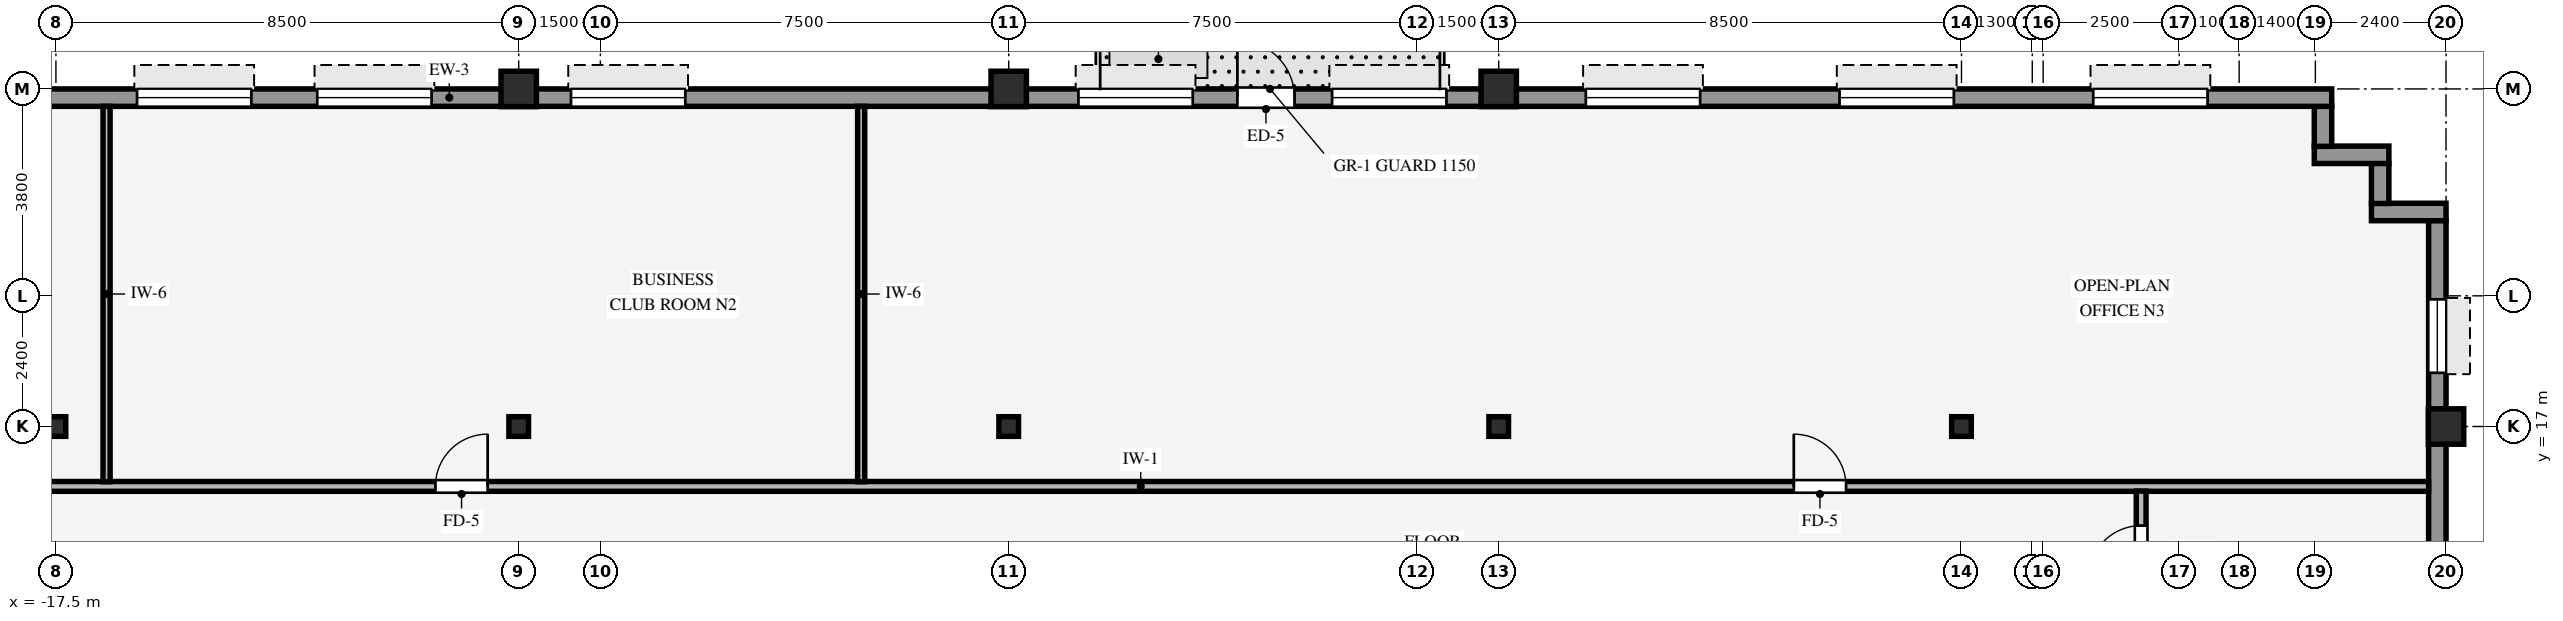
"""IFC4 building model, lengths in metres.
Left out: names, types, materials, properties, quantities, classifications, styles, units other than length and angle.
Written with IfcOpenShell. Run it as: python <this file> out.ifc"""

import sys

from ifc_helpers import new_model, si_unit, direction, frame, frame_2d, origin, origin_2d, place, context, subcontext, project, spatial, rectangle, hollow_rectangle, i_section, extrude, source, transform, mapped, element, fill, save


model = new_model("IFC4")
c1 = context("Model", 3, precision=1e-05, world=origin(), true_north=direction((0.0, 1.0)))
c2 = subcontext(c1, "Body", "Model", "MODEL_VIEW")
j1 = project(units=[si_unit("LENGTHUNIT", "METRE"), si_unit("PLANEANGLEUNIT", "RADIAN")], contexts=[c1])
p1 = place(None, origin())
s1 = spatial("IfcSite", under=j1, at=p1, CompositionType="ELEMENT")
p2 = place(p1, origin())
s2 = spatial("IfcBuilding", under=s1, at=p2, CompositionType="ELEMENT")
p3 = place(p2, frame((0.0, 0.0, 138.45)))
s3 = spatial("IfcBuildingStorey", under=s2, at=p3, CompositionType="ELEMENT", Elevation=138.45)
for number, where, z_axis, x_axis in (
    (1, (26.4, 17.0, 0.0), (0.0, 0.0, 1.0), (1.0, 0.0, 0.0)),
    (2, (-9.0, 23.2, 0.0), (0.0, 0.0, 1.0), (1.0, 0.0, 0.0)),
    (3, (0.0, 23.2, 0.0), (0.0, 0.0, 1.0), (1.0, 0.0, 0.0)),
    (4, (9.0, 23.2, 0.0), (0.0, 0.0, 1.0), (1.0, 0.0, 0.0)),
):
    element("IfcColumn", number, at=place(p3, frame(where, z_axis=z_axis, x_axis=x_axis)), inside=s3, PredefinedType="COLUMN", context=c2, shape_type="SweptSolid", body=[
        extrude(hollow_rectangle(XDim=0.65, YDim=0.65, WallThickness=0.04, InnerFilletRadius=0.04, OuterFilletRadius=0.08, at=origin_2d()), origin(), (0.0, 0.0, 1.0), 3.37),
    ])
for number, where, z_axis, x_axis in (
    (5, (0.0, 17.0, 0.0), (0.0, 0.0, 1.0), (1.0, 0.0, 0.0)),
    (6, (-17.5, 17.0, 0.0), (0.0, 0.0, 1.0), (1.0, 0.0, 0.0)),
    (7, (-9.0, 17.0, 0.0), (0.0, 0.0, 1.0), (1.0, 0.0, 0.0)),
    (8, (9.0, 17.0, 0.0), (0.0, 0.0, 1.0), (1.0, 0.0, 0.0)),
    (9, (17.5, 17.0, 0.0), (0.0, 0.0, 1.0), (1.0, 0.0, 0.0)),
):
    element("IfcColumn", number, at=place(p3, frame(where, z_axis=z_axis, x_axis=x_axis)), inside=s3, PredefinedType="COLUMN", context=c2, shape_type="SweptSolid", body=[
        extrude(i_section(OverallWidth=0.36, OverallDepth=0.36, WebThickness=0.021, FlangeThickness=0.021, FilletRadius=0.018, at=origin_2d()), origin(), (0.0, 0.0, 1.0), 3.37),
    ])
p4 = place(p3, frame((26.24, -20.784, 0.0), z_axis=(0.0, 0.0, 1.0), x_axis=(0.0, 1.0, 0.0)))
e10 = element("IfcWall", 10, at=p4, inside=s3, PredefinedType="STANDARD", context=c2, shape_type="SweptSolid", body=[
    extrude(rectangle(XDim=41.568, YDim=0.32, at=frame_2d((20.784, 0.0))), origin(), (0.0, 0.0, 1.0), 2.705),
])
p5 = place(p4, frame((1.448, 0.0, 0.8)))
e11 = element("IfcOpeningElement", 11, at=p5, cuts=e10, PredefinedType="OPENING", context=c2, shape_type="SweptSolid", body=[
    extrude(rectangle(XDim=1.35, YDim=1.56, at=frame_2d((0.675, 0.78))), frame((0.0, 0.17, 0.0), z_axis=(0.0, -1.0, 0.0), x_axis=(1.0, 0.0, 0.0)), (0.0, 0.0, 1.0), 0.34),
])
p6 = place(p4, frame((7.744, 0.0, 0.8)))
e12 = element("IfcOpeningElement", 12, at=p6, cuts=e10, PredefinedType="OPENING", context=c2, shape_type="SweptSolid", body=[
    extrude(rectangle(XDim=1.35, YDim=1.56, at=frame_2d((0.675, 0.78))), frame((0.0, 0.17, 0.0), z_axis=(0.0, -1.0, 0.0), x_axis=(1.0, 0.0, 0.0)), (0.0, 0.0, 1.0), 0.34),
])
p7 = place(p4, frame((12.69, 0.0, 0.8)))
e13 = element("IfcOpeningElement", 13, at=p7, cuts=e10, PredefinedType="OPENING", context=c2, shape_type="SweptSolid", body=[
    extrude(rectangle(XDim=1.35, YDim=1.56, at=frame_2d((0.675, 0.78))), frame((0.0, 0.17, 0.0), z_axis=(0.0, -1.0, 0.0), x_axis=(1.0, 0.0, 0.0)), (0.0, 0.0, 1.0), 0.34),
])
p8 = place(p4, frame((17.636, 0.0, 0.8)))
e14 = element("IfcOpeningElement", 14, at=p8, cuts=e10, PredefinedType="OPENING", context=c2, shape_type="SweptSolid", body=[
    extrude(rectangle(XDim=1.35, YDim=1.56, at=frame_2d((0.675, 0.78))), frame((0.0, 0.17, 0.0), z_axis=(0.0, -1.0, 0.0), x_axis=(1.0, 0.0, 0.0)), (0.0, 0.0, 1.0), 0.34),
])
p9 = place(p4, frame((22.582, 0.0, 0.8)))
e15 = element("IfcOpeningElement", 15, at=p9, cuts=e10, PredefinedType="OPENING", context=c2, shape_type="SweptSolid", body=[
    extrude(rectangle(XDim=1.35, YDim=1.56, at=frame_2d((0.675, 0.78))), frame((0.0, 0.17, 0.0), z_axis=(0.0, -1.0, 0.0), x_axis=(1.0, 0.0, 0.0)), (0.0, 0.0, 1.0), 0.34),
])
p10 = place(p4, frame((27.528, 0.0, 0.8)))
e16 = element("IfcOpeningElement", 16, at=p10, cuts=e10, PredefinedType="OPENING", context=c2, shape_type="SweptSolid", body=[
    extrude(rectangle(XDim=1.35, YDim=1.56, at=frame_2d((0.675, 0.78))), frame((0.0, 0.17, 0.0), z_axis=(0.0, -1.0, 0.0), x_axis=(1.0, 0.0, 0.0)), (0.0, 0.0, 1.0), 0.34),
])
p11 = place(p4, frame((32.474, 0.0, 0.8)))
e17 = element("IfcOpeningElement", 17, at=p11, cuts=e10, PredefinedType="OPENING", context=c2, shape_type="SweptSolid", body=[
    extrude(rectangle(XDim=1.35, YDim=1.56, at=frame_2d((0.675, 0.78))), frame((0.0, 0.17, 0.0), z_axis=(0.0, -1.0, 0.0), x_axis=(1.0, 0.0, 0.0)), (0.0, 0.0, 1.0), 0.34),
])
p12 = place(p4, frame((38.77, 0.0, 0.8)))
e18 = element("IfcOpeningElement", 18, at=p12, cuts=e10, PredefinedType="OPENING", context=c2, shape_type="SweptSolid", body=[
    extrude(rectangle(XDim=1.35, YDim=1.56, at=frame_2d((0.675, 0.78))), frame((0.0, 0.17, 0.0), z_axis=(0.0, -1.0, 0.0), x_axis=(1.0, 0.0, 0.0)), (0.0, 0.0, 1.0), 0.34),
])
p13 = place(p3, frame((25.03, 20.94, 0.0), z_axis=(0.0, 0.0, 1.0), x_axis=(1.0, 0.0, 0.0)))
e19 = element("IfcWall", 19, at=p13, inside=s3, PredefinedType="STANDARD", context=c2, shape_type="SweptSolid", body=[
    extrude(rectangle(XDim=1.37, YDim=0.32, at=frame_2d((0.685, 0.0))), origin(), (0.0, 0.0, 1.0), 3.36),
])
p14 = place(p3, frame((25.19, 21.096, 0.0), z_axis=(0.0, 0.0, 1.0), x_axis=(0.0, 1.0, 0.0)))
e20 = element("IfcWall", 20, at=p14, inside=s3, PredefinedType="STANDARD", context=c2, shape_type="SweptSolid", body=[
    extrude(rectangle(XDim=0.738, YDim=0.32, at=frame_2d((0.369, 0.0))), origin(), (0.0, 0.0, 1.0), 3.36),
])
p15 = place(p3, frame((23.98, 21.99, 0.0), z_axis=(0.0, 0.0, 1.0), x_axis=(1.0, 0.0, 0.0)))
e21 = element("IfcWall", 21, at=p15, inside=s3, PredefinedType="STANDARD", context=c2, shape_type="SweptSolid", body=[
    extrude(rectangle(XDim=1.37, YDim=0.32, at=frame_2d((0.685, 0.0))), origin(), (0.0, 0.0, 1.0), 3.36),
])
p16 = place(p3, frame((24.14, 22.146, 0.0), z_axis=(0.0, 0.0, 1.0), x_axis=(0.0, 1.0, 0.0)))
e22 = element("IfcWall", 22, at=p16, inside=s3, PredefinedType="STANDARD", context=c2, shape_type="SweptSolid", body=[
    extrude(rectangle(XDim=0.738, YDim=0.32, at=frame_2d((0.369, 0.0))), origin(), (0.0, 0.0, 1.0), 3.36),
])
p17 = place(p3, frame((-24.3, 23.04, 0.0), z_axis=(0.0, 0.0, 1.0), x_axis=(1.0, 0.0, 0.0)))
e23 = element("IfcWall", 23, at=p17, inside=s3, PredefinedType="STANDARD", context=c2, shape_type="SweptSolid", body=[
    extrude(rectangle(XDim=48.6, YDim=0.32, at=frame_2d((24.3, 0.0))), origin(), (0.0, 0.0, 1.0), 2.705),
])
p18 = place(p17, frame((28.5, 0.0, 0.0)))
e24 = element("IfcOpeningElement", 24, at=p18, cuts=e23, PredefinedType="OPENING", context=c2, shape_type="SweptSolid", body=[
    extrude(rectangle(XDim=1.05, YDim=2.1, at=frame_2d((0.525, 1.05))), frame((0.0, 0.17, 0.0), z_axis=(0.0, -1.0, 0.0), x_axis=(1.0, 0.0, 0.0)), (0.0, 0.0, 1.0), 0.34),
])
p19 = place(p17, frame((2.28, 0.0, 0.8)))
e25 = element("IfcOpeningElement", 25, at=p19, cuts=e23, PredefinedType="OPENING", context=c2, shape_type="SweptSolid", body=[
    extrude(rectangle(XDim=2.1, YDim=1.56, at=frame_2d((1.05, 0.78))), frame((0.0, 0.17, 0.0), z_axis=(0.0, -1.0, 0.0), x_axis=(1.0, 0.0, 0.0)), (0.0, 0.0, 1.0), 0.34),
])
p20 = place(p17, frame((8.29, 0.0, 0.8)))
e26 = element("IfcOpeningElement", 26, at=p20, cuts=e23, PredefinedType="OPENING", context=c2, shape_type="SweptSolid", body=[
    extrude(rectangle(XDim=2.1, YDim=1.56, at=frame_2d((1.05, 0.78))), frame((0.0, 0.17, 0.0), z_axis=(0.0, -1.0, 0.0), x_axis=(1.0, 0.0, 0.0)), (0.0, 0.0, 1.0), 0.34),
])
p21 = place(p17, frame((11.6, 0.0, 0.8)))
e27 = element("IfcOpeningElement", 27, at=p21, cuts=e23, PredefinedType="OPENING", context=c2, shape_type="SweptSolid", body=[
    extrude(rectangle(XDim=2.1, YDim=1.56, at=frame_2d((1.05, 0.78))), frame((0.0, 0.17, 0.0), z_axis=(0.0, -1.0, 0.0), x_axis=(1.0, 0.0, 0.0)), (0.0, 0.0, 1.0), 0.34),
])
p22 = place(p17, frame((16.26, 0.0, 0.8)))
e28 = element("IfcOpeningElement", 28, at=p22, cuts=e23, PredefinedType="OPENING", context=c2, shape_type="SweptSolid", body=[
    extrude(rectangle(XDim=2.1, YDim=1.56, at=frame_2d((1.05, 0.78))), frame((0.0, 0.17, 0.0), z_axis=(0.0, -1.0, 0.0), x_axis=(1.0, 0.0, 0.0)), (0.0, 0.0, 1.0), 0.34),
])
p23 = place(p17, frame((25.58, 0.0, 0.8)))
e29 = element("IfcOpeningElement", 29, at=p23, cuts=e23, PredefinedType="OPENING", context=c2, shape_type="SweptSolid", body=[
    extrude(rectangle(XDim=2.1, YDim=1.56, at=frame_2d((1.05, 0.78))), frame((0.0, 0.17, 0.0), z_axis=(0.0, -1.0, 0.0), x_axis=(1.0, 0.0, 0.0)), (0.0, 0.0, 1.0), 0.34),
])
p24 = place(p17, frame((30.24, 0.0, 0.8)))
e30 = element("IfcOpeningElement", 30, at=p24, cuts=e23, PredefinedType="OPENING", context=c2, shape_type="SweptSolid", body=[
    extrude(rectangle(XDim=2.1, YDim=1.56, at=frame_2d((1.05, 0.78))), frame((0.0, 0.17, 0.0), z_axis=(0.0, -1.0, 0.0), x_axis=(1.0, 0.0, 0.0)), (0.0, 0.0, 1.0), 0.34),
])
p25 = place(p17, frame((34.9, 0.0, 0.8)))
e31 = element("IfcOpeningElement", 31, at=p25, cuts=e23, PredefinedType="OPENING", context=c2, shape_type="SweptSolid", body=[
    extrude(rectangle(XDim=2.1, YDim=1.56, at=frame_2d((1.05, 0.78))), frame((0.0, 0.17, 0.0), z_axis=(0.0, -1.0, 0.0), x_axis=(1.0, 0.0, 0.0)), (0.0, 0.0, 1.0), 0.34),
])
p26 = place(p17, frame((39.56, 0.0, 0.8)))
e32 = element("IfcOpeningElement", 32, at=p26, cuts=e23, PredefinedType="OPENING", context=c2, shape_type="SweptSolid", body=[
    extrude(rectangle(XDim=2.1, YDim=1.56, at=frame_2d((1.05, 0.78))), frame((0.0, 0.17, 0.0), z_axis=(0.0, -1.0, 0.0), x_axis=(1.0, 0.0, 0.0)), (0.0, 0.0, 1.0), 0.34),
])
p27 = place(p17, frame((44.22, 0.0, 0.8)))
e33 = element("IfcOpeningElement", 33, at=p27, cuts=e23, PredefinedType="OPENING", context=c2, shape_type="SweptSolid", body=[
    extrude(rectangle(XDim=2.1, YDim=1.56, at=frame_2d((1.05, 0.78))), frame((0.0, 0.17, 0.0), z_axis=(0.0, -1.0, 0.0), x_axis=(1.0, 0.0, 0.0)), (0.0, 0.0, 1.0), 0.34),
])
p28 = place(p3, frame((-26.08, 15.9, 0.0), z_axis=(0.0, 0.0, 1.0), x_axis=(1.0, 0.0, 0.0)))
e34 = element("IfcWall", 34, at=p28, inside=s3, PredefinedType="PARTITIONING", context=c2, shape_type="SweptSolid", body=[
    extrude(rectangle(XDim=52.16, YDim=0.18, at=frame_2d((26.08, 0.0))), origin(), (0.0, 0.0, 1.0), 3.36),
])
p29 = place(p28, frame((15.55, 0.0, 0.0)))
e35 = element("IfcOpeningElement", 35, at=p29, cuts=e34, PredefinedType="OPENING", context=c2, shape_type="SweptSolid", body=[
    extrude(rectangle(XDim=0.96, YDim=2.1, at=frame_2d((0.48, 1.05))), frame((0.0, 0.1, 0.0), z_axis=(0.0, -1.0, 0.0), x_axis=(1.0, 0.0, 0.0)), (0.0, 0.0, 1.0), 0.2),
])
p30 = place(p28, frame((40.5, 0.0, 0.0)))
e36 = element("IfcOpeningElement", 36, at=p30, cuts=e34, PredefinedType="OPENING", context=c2, shape_type="SweptSolid", body=[
    extrude(rectangle(XDim=0.96, YDim=2.1, at=frame_2d((0.48, 1.05))), frame((0.0, 0.1, 0.0), z_axis=(0.0, -1.0, 0.0), x_axis=(1.0, 0.0, 0.0)), (0.0, 0.0, 1.0), 0.2),
])
p31 = place(p28, frame((6.65, 0.0, 0.0)))
e37 = element("IfcOpeningElement", 37, at=p31, cuts=e34, PredefinedType="OPENING", context=c2, shape_type="SweptSolid", body=[
    extrude(rectangle(XDim=0.96, YDim=2.1, at=frame_2d((0.48, 1.05))), frame((0.0, 0.1, 0.0), z_axis=(0.0, -1.0, 0.0), x_axis=(1.0, 0.0, 0.0)), (0.0, 0.0, 1.0), 0.2),
])
for number, where, z_axis, x_axis in (
    (38, (-16.57, 15.986, 0.0), (0.0, 0.0, 1.0), (0.0, 1.0, 0.0)),
    (39, (-2.71, 15.986, 0.0), (0.0, 0.0, 1.0), (0.0, 1.0, 0.0)),
):
    element("IfcWall", number, at=place(p3, frame(where, z_axis=z_axis, x_axis=x_axis)), inside=s3, PredefinedType="PARTITIONING", context=c2, shape_type="SweptSolid", body=[
        extrude(rectangle(XDim=6.894, YDim=0.13, at=frame_2d((3.447, 0.0))), origin(), (0.0, 0.0, 1.0), 3.36),
    ])
p32 = place(p3, frame((20.8, 13.586, 0.0), z_axis=(0.0, 0.0, 1.0), x_axis=(0.0, 1.0, 0.0)))
e40 = element("IfcWall", 40, at=p32, inside=s3, PredefinedType="PARTITIONING", context=c2, shape_type="SweptSolid", body=[
    extrude(rectangle(XDim=2.228, YDim=0.18, at=frame_2d((1.114, 0.0))), origin(), (0.0, 0.0, 1.0), 3.36),
])
p33 = place(p32, frame((0.634, 0.0, 0.0)))
e41 = element("IfcOpeningElement", 41, at=p33, cuts=e40, PredefinedType="OPENING", context=c2, shape_type="SweptSolid", body=[
    extrude(rectangle(XDim=0.96, YDim=2.1, at=frame_2d((0.48, 1.05))), frame((0.0, 0.1, 0.0), z_axis=(0.0, -1.0, 0.0), x_axis=(1.0, 0.0, 0.0)), (0.0, 0.0, 1.0), 0.2),
])
m1 = source(origin(), c2, "Body", "SweptSolid", [
    extrude(rectangle(XDim=1.35, YDim=1.56, at=frame_2d((0.675, 0.78))), frame((0.0, 0.03, 0.0), z_axis=(0.0, -1.0, 0.0), x_axis=(1.0, 0.0, 0.0)), (0.0, 0.0, 1.0), 0.06),
])
p34 = place(p12, origin())
e42 = element("IfcWindow", 42, at=p34, inside=s3, PartitioningType="SINGLE_PANEL", PredefinedType="WINDOW", context=c2, shape_type="MappedRepresentation", body=[
    mapped(m1, transform((0.0, 0.0, 0.0), scale=1.0)),
])
fill(e18, e42)
m2 = source(origin(), c2, "Body", "SweptSolid", [
    extrude(rectangle(XDim=1.05, YDim=2.1, at=frame_2d((0.525, 1.05))), frame((0.0, 0.025, 0.0), z_axis=(0.0, -1.0, 0.0), x_axis=(1.0, 0.0, 0.0)), (0.0, 0.0, 1.0), 0.05),
])
p35 = place(p18, origin())
e43 = element("IfcDoor", 43, at=p35, inside=s3, OperationType="SINGLE_SWING_LEFT", PredefinedType="DOOR", context=c2, shape_type="MappedRepresentation", body=[
    mapped(m2, transform((0.0, 0.0, 0.0), scale=1.0)),
])
fill(e24, e43)
m3 = source(origin(), c2, "Body", "SweptSolid", [
    extrude(rectangle(XDim=2.1, YDim=1.56, at=frame_2d((1.05, 0.78))), frame((0.0, 0.03, 0.0), z_axis=(0.0, -1.0, 0.0), x_axis=(1.0, 0.0, 0.0)), (0.0, 0.0, 1.0), 0.06),
])
p36 = place(p20, origin())
e44 = element("IfcWindow", 44, at=p36, inside=s3, PartitioningType="SINGLE_PANEL", PredefinedType="WINDOW", context=c2, shape_type="MappedRepresentation", body=[
    mapped(m3, transform((0.0, 0.0, 0.0), scale=1.0)),
])
fill(e26, e44)
p37 = place(p21, origin())
e45 = element("IfcWindow", 45, at=p37, inside=s3, PartitioningType="SINGLE_PANEL", PredefinedType="WINDOW", context=c2, shape_type="MappedRepresentation", body=[
    mapped(m3, transform((0.0, 0.0, 0.0), scale=1.0)),
])
fill(e27, e45)
p38 = place(p22, origin())
e46 = element("IfcWindow", 46, at=p38, inside=s3, PartitioningType="SINGLE_PANEL", PredefinedType="WINDOW", context=c2, shape_type="MappedRepresentation", body=[
    mapped(m3, transform((0.0, 0.0, 0.0), scale=1.0)),
])
fill(e28, e46)
p39 = place(p23, origin())
e47 = element("IfcWindow", 47, at=p39, inside=s3, PartitioningType="SINGLE_PANEL", PredefinedType="WINDOW", context=c2, shape_type="MappedRepresentation", body=[
    mapped(m3, transform((0.0, 0.0, 0.0), scale=1.0)),
])
fill(e29, e47)
p40 = place(p24, origin())
e48 = element("IfcWindow", 48, at=p40, inside=s3, PartitioningType="SINGLE_PANEL", PredefinedType="WINDOW", context=c2, shape_type="MappedRepresentation", body=[
    mapped(m3, transform((0.0, 0.0, 0.0), scale=1.0)),
])
fill(e30, e48)
p41 = place(p25, origin())
e49 = element("IfcWindow", 49, at=p41, inside=s3, PartitioningType="SINGLE_PANEL", PredefinedType="WINDOW", context=c2, shape_type="MappedRepresentation", body=[
    mapped(m3, transform((0.0, 0.0, 0.0), scale=1.0)),
])
fill(e31, e49)
p42 = place(p26, origin())
e50 = element("IfcWindow", 50, at=p42, inside=s3, PartitioningType="SINGLE_PANEL", PredefinedType="WINDOW", context=c2, shape_type="MappedRepresentation", body=[
    mapped(m3, transform((0.0, 0.0, 0.0), scale=1.0)),
])
fill(e32, e50)
p43 = place(p27, origin())
e51 = element("IfcWindow", 51, at=p43, inside=s3, PartitioningType="SINGLE_PANEL", PredefinedType="WINDOW", context=c2, shape_type="MappedRepresentation", body=[
    mapped(m3, transform((0.0, 0.0, 0.0), scale=1.0)),
])
fill(e33, e51)
m4 = source(origin(), c2, "Body", "SweptSolid", [
    extrude(rectangle(XDim=0.96, YDim=2.1, at=frame_2d((0.48, 1.05))), frame((0.0, 0.025, 0.0), z_axis=(0.0, -1.0, 0.0), x_axis=(1.0, 0.0, 0.0)), (0.0, 0.0, 1.0), 0.05),
])
p44 = place(p29, origin())
e52 = element("IfcDoor", 52, at=p44, inside=s3, OperationType="SINGLE_SWING_RIGHT", PredefinedType="DOOR", context=c2, shape_type="MappedRepresentation", body=[
    mapped(m4, transform((0.0, 0.0, 0.0), scale=1.0)),
])
fill(e35, e52)
p45 = place(p30, origin())
e53 = element("IfcDoor", 53, at=p45, inside=s3, OperationType="SINGLE_SWING_LEFT", PredefinedType="DOOR", context=c2, shape_type="MappedRepresentation", body=[
    mapped(m4, transform((0.0, 0.0, 0.0), scale=1.0)),
])
fill(e36, e53)
p46 = place(p33, origin())
e54 = element("IfcDoor", 54, at=p46, inside=s3, OperationType="SINGLE_SWING_LEFT", PredefinedType="DOOR", context=c2, shape_type="MappedRepresentation", body=[
    mapped(m4, transform((0.0, 0.0, 0.0), scale=1.0)),
])
fill(e41, e54)
save(model, sys.argv[1])
